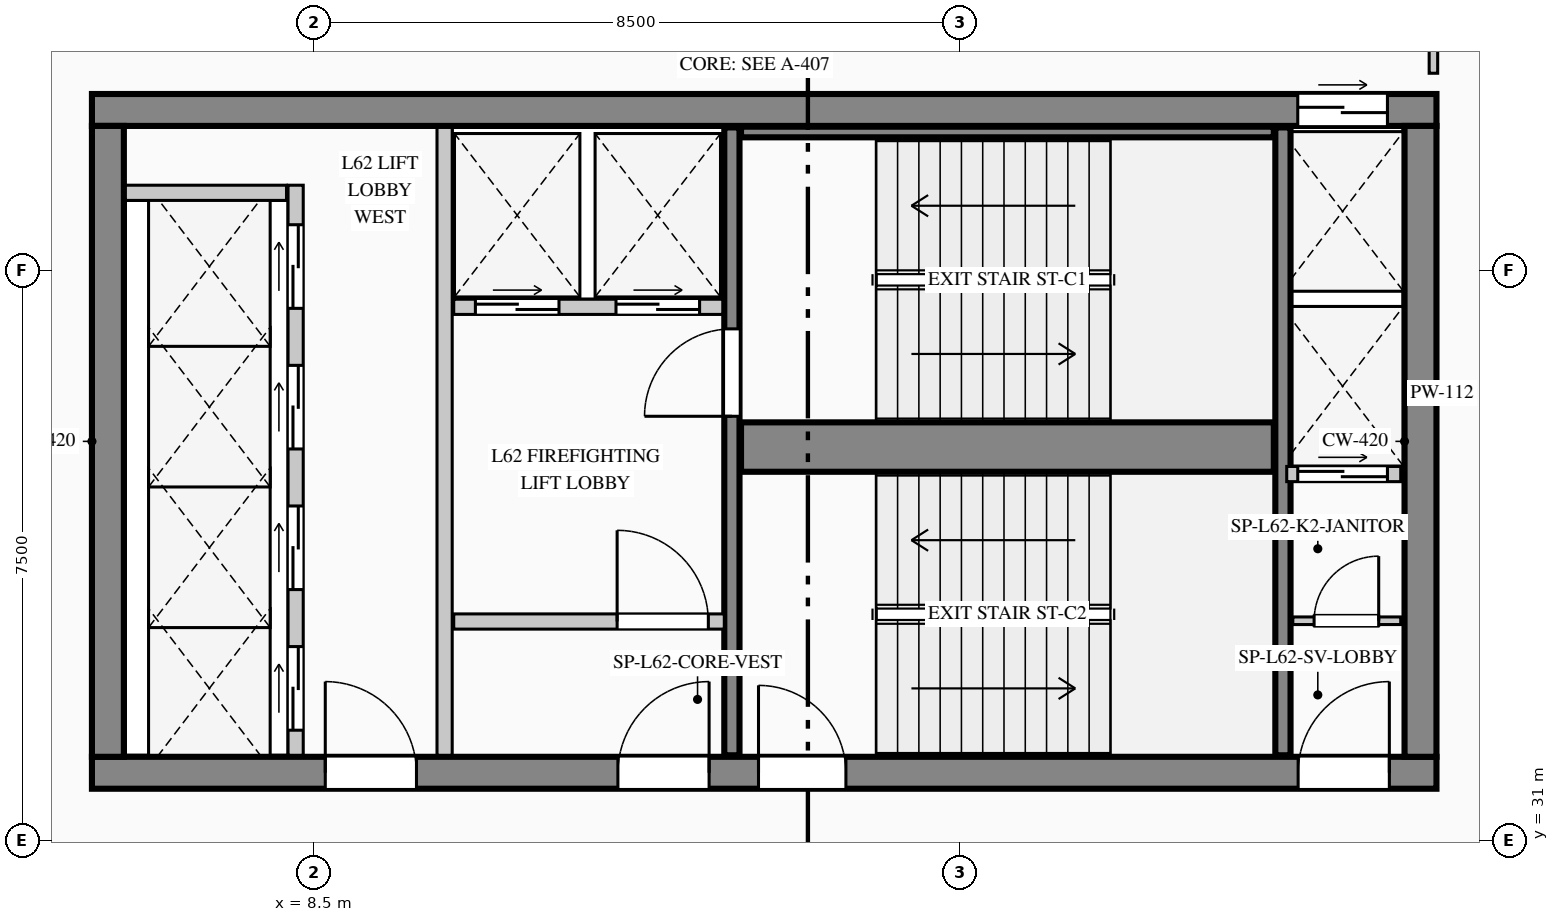
"""IFC4 building model, lengths in metres.
Left out: names, types, materials, properties, quantities, classifications, styles, units other than length and angle.
Written with IfcOpenShell. Run it as: python <this file> out.ifc"""

import sys

from ifc_helpers import new_model, si_unit, direction, frame, frame_2d, origin, place, context, subcontext, project, spatial, rectangle, extrude, element, fill, save


model = new_model("IFC4")
c1 = context("Model", 3, precision=1e-05, world=origin(), true_north=direction((0.0, 1.0)))
c2 = subcontext(c1, "Body", "Model", "MODEL_VIEW")
j1 = project(units=[si_unit("LENGTHUNIT", "METRE"), si_unit("PLANEANGLEUNIT", "RADIAN")], contexts=[c1])
p1 = place(None, origin())
s1 = spatial("IfcSite", under=j1, at=p1, CompositionType="ELEMENT")
p2 = place(p1, origin())
s2 = spatial("IfcBuilding", under=s1, at=p2, CompositionType="ELEMENT")
p3 = place(p2, frame((0.0, 0.0, 260.65)))
s3 = spatial("IfcBuildingStorey", under=s2, at=p3, CompositionType="ELEMENT", Elevation=260.65)
p4 = place(p3, frame((5.58, 40.61, 0.0), z_axis=(0.0, 0.0, 1.0), x_axis=(1.0, 0.0, 0.0)))
e1 = element("IfcWall", 1, at=p4, inside=s3, PredefinedType="SHEAR", context=c2, shape_type="SweptSolid", body=[
    extrude(rectangle(XDim=17.69, YDim=0.42, at=frame_2d((8.845, 0.0))), origin(), (0.0, 0.0, 1.0), 3.95),
])
p5 = place(p4, frame((15.865, 0.0, 0.0)))
e2 = element("IfcOpeningElement", 2, at=p5, cuts=e1, PredefinedType="OPENING", context=c2, shape_type="SweptSolid", body=[
    extrude(rectangle(XDim=1.18, YDim=2.25, at=frame_2d((0.59, 1.125))), frame((0.0, 0.22, 0.0), z_axis=(0.0, -1.0, 0.0), x_axis=(1.0, 0.0, 0.0)), (0.0, 0.0, 1.0), 0.44),
])
p6 = place(p3, frame((5.58, 31.89, 0.0), z_axis=(0.0, 0.0, 1.0), x_axis=(1.0, 0.0, 0.0)))
e3 = element("IfcWall", 3, at=p6, inside=s3, PredefinedType="SHEAR", context=c2, shape_type="SweptSolid", body=[
    extrude(rectangle(XDim=17.69, YDim=0.42, at=frame_2d((8.845, 0.0))), origin(), (0.0, 0.0, 1.0), 3.95),
])
p7 = place(p6, frame((3.07, 0.0, 0.0)))
e4 = element("IfcOpeningElement", 4, at=p7, cuts=e3, PredefinedType="OPENING", context=c2, shape_type="SweptSolid", body=[
    extrude(rectangle(XDim=1.2, YDim=2.2, at=frame_2d((0.6, 1.1))), frame((0.0, 0.22, 0.0), z_axis=(0.0, -1.0, 0.0), x_axis=(1.0, 0.0, 0.0)), (0.0, 0.0, 1.0), 0.44),
])
p8 = place(p6, frame((6.92, 0.0, 0.0)))
e5 = element("IfcOpeningElement", 5, at=p8, cuts=e3, PredefinedType="OPENING", context=c2, shape_type="SweptSolid", body=[
    extrude(rectangle(XDim=1.2, YDim=2.2, at=frame_2d((0.6, 1.1))), frame((0.0, 0.22, 0.0), z_axis=(0.0, -1.0, 0.0), x_axis=(1.0, 0.0, 0.0)), (0.0, 0.0, 1.0), 0.44),
])
p9 = place(p6, frame((8.77, 0.0, 0.0)))
e6 = element("IfcOpeningElement", 6, at=p9, cuts=e3, PredefinedType="OPENING", context=c2, shape_type="SweptSolid", body=[
    extrude(rectangle(XDim=1.15, YDim=2.2, at=frame_2d((0.575, 1.1))), frame((0.0, 0.22, 0.0), z_axis=(0.0, -1.0, 0.0), x_axis=(1.0, 0.0, 0.0)), (0.0, 0.0, 1.0), 0.44),
])
p10 = place(p6, frame((15.87, 0.0, 0.0)))
e7 = element("IfcOpeningElement", 7, at=p10, cuts=e3, PredefinedType="OPENING", context=c2, shape_type="SweptSolid", body=[
    extrude(rectangle(XDim=1.2, YDim=2.2, at=frame_2d((0.6, 1.1))), frame((0.0, 0.22, 0.0), z_axis=(0.0, -1.0, 0.0), x_axis=(1.0, 0.0, 0.0)), (0.0, 0.0, 1.0), 0.44),
])
for number, where, z_axis, x_axis in (
    (8, (5.79, 32.1, 0.0), (0.0, 0.0, 1.0), (0.0, 1.0, 0.0)),
    (9, (23.06, 32.1, 0.0), (0.0, 0.0, 1.0), (0.0, 1.0, 0.0)),
):
    element("IfcWall", number, at=place(p3, frame(where, z_axis=z_axis, x_axis=x_axis)), inside=s3, PredefinedType="SHEAR", context=c2, shape_type="SweptSolid", body=[
        extrude(rectangle(XDim=8.3, YDim=0.42, at=frame_2d((4.15, 0.0))), origin(), (0.0, 0.0, 1.0), 3.95),
    ])
p11 = place(p3, frame((14.0, 32.12, 0.0), z_axis=(0.0, 0.0, 1.0), x_axis=(0.0, 1.0, 0.0)))
e10 = element("IfcWall", 10, at=p11, inside=s3, PredefinedType="SHEAR", context=c2, shape_type="SweptSolid", body=[
    extrude(rectangle(XDim=8.26, YDim=0.2, at=frame_2d((4.13, 0.0))), origin(), (0.0, 0.0, 1.0), 3.95),
])
p12 = place(p11, frame((4.46, 0.0, 0.0)))
e11 = element("IfcOpeningElement", 11, at=p12, cuts=e10, PredefinedType="OPENING", context=c2, shape_type="SweptSolid", body=[
    extrude(rectangle(XDim=1.15, YDim=2.2, at=frame_2d((0.575, 1.1))), frame((0.0, 0.11, 0.0), z_axis=(0.0, -1.0, 0.0), x_axis=(1.0, 0.0, 0.0)), (0.0, 0.0, 1.0), 0.22),
])
p13 = place(p3, frame((14.12, 36.175, 0.0), z_axis=(0.0, 0.0, 1.0), x_axis=(1.0, 0.0, 0.0)))
e12 = element("IfcWall", 12, at=p13, inside=s3, PredefinedType="SHEAR", context=c2, shape_type="SweptSolid", body=[
    extrude(rectangle(XDim=7.01, YDim=0.65, at=frame_2d((3.505, 0.0))), origin(), (0.0, 0.0, 1.0), 3.95),
])
p14 = place(p3, frame((21.25, 32.12, 0.0), z_axis=(0.0, 0.0, 1.0), x_axis=(0.0, 1.0, 0.0)))
e13 = element("IfcWall", 13, at=p14, inside=s3, PredefinedType="SHEAR", context=c2, shape_type="SweptSolid", body=[
    extrude(rectangle(XDim=8.26, YDim=0.2, at=frame_2d((4.13, 0.0))), origin(), (0.0, 0.0, 1.0), 3.95),
])
p15 = place(p3, frame((14.12, 40.32, 0.0), z_axis=(0.0, 0.0, 1.0), x_axis=(1.0, 0.0, 0.0)))
e14 = element("IfcWall", 14, at=p15, inside=s3, PredefinedType="SHEAR", context=c2, shape_type="SweptSolid", body=[
    extrude(rectangle(XDim=7.01, YDim=0.14, at=frame_2d((3.505, 0.0))), origin(), (0.0, 0.0, 1.0), 3.95),
])
p16 = place(p3, frame((6.133, 4.42, 0.0), z_axis=(0.0, 0.0, 1.0), x_axis=(-0.089522678378, 0.995984784048, 0.0)))
e15 = element("IfcWall", 15, at=p16, inside=s3, PredefinedType="STANDARD", context=c2, shape_type="SweptSolid", body=[
    extrude(rectangle(XDim=37.31, YDim=0.24, at=frame_2d((18.655, 0.0))), origin(), (0.0, 0.0, 1.0), 3.7),
])
p17 = place(p16, frame((23.053, 0.0, 0.9)))
e16 = element("IfcOpeningElement", 16, at=p17, cuts=e15, PredefinedType="OPENING", context=c2, shape_type="SweptSolid", body=[
    extrude(rectangle(XDim=1.65, YDim=1.95, at=frame_2d((0.825, 0.975))), frame((0.0, 0.13, 0.0), z_axis=(0.0, -1.0, 0.0), x_axis=(1.0, 0.0, 0.0)), (0.0, 0.0, 1.0), 0.26),
])
p18 = place(p3, frame((8.26, 32.12, 0.0), z_axis=(0.0, 0.0, 1.0), x_axis=(0.0, 1.0, 0.0)))
e17 = element("IfcWall", 17, at=p18, inside=s3, PredefinedType="PARTITIONING", context=c2, shape_type="SweptSolid", body=[
    extrude(rectangle(XDim=7.5, YDim=0.2, at=frame_2d((3.75, 0.0))), origin(), (0.0, 0.0, 1.0), 3.7),
])
p19 = place(p18, frame((0.33, 0.0, 0.0)))
e18 = element("IfcOpeningElement", 18, at=p19, cuts=e17, PredefinedType="OPENING", context=c2, shape_type="SweptSolid", body=[
    extrude(rectangle(XDim=1.1, YDim=2.2, at=frame_2d((0.55, 1.1))), frame((0.0, 0.11, 0.0), z_axis=(0.0, -1.0, 0.0), x_axis=(1.0, 0.0, 0.0)), (0.0, 0.0, 1.0), 0.22),
])
p20 = place(p18, frame((2.18, 0.0, 0.0)))
e19 = element("IfcOpeningElement", 19, at=p20, cuts=e17, PredefinedType="OPENING", context=c2, shape_type="SweptSolid", body=[
    extrude(rectangle(XDim=1.1, YDim=2.2, at=frame_2d((0.55, 1.1))), frame((0.0, 0.11, 0.0), z_axis=(0.0, -1.0, 0.0), x_axis=(1.0, 0.0, 0.0)), (0.0, 0.0, 1.0), 0.22),
])
p21 = place(p18, frame((4.03, 0.0, 0.0)))
e20 = element("IfcOpeningElement", 20, at=p21, cuts=e17, PredefinedType="OPENING", context=c2, shape_type="SweptSolid", body=[
    extrude(rectangle(XDim=1.1, YDim=2.2, at=frame_2d((0.55, 1.1))), frame((0.0, 0.11, 0.0), z_axis=(0.0, -1.0, 0.0), x_axis=(1.0, 0.0, 0.0)), (0.0, 0.0, 1.0), 0.22),
])
p22 = place(p18, frame((5.88, 0.0, 0.0)))
e21 = element("IfcOpeningElement", 21, at=p22, cuts=e17, PredefinedType="OPENING", context=c2, shape_type="SweptSolid", body=[
    extrude(rectangle(XDim=1.1, YDim=2.2, at=frame_2d((0.55, 1.1))), frame((0.0, 0.11, 0.0), z_axis=(0.0, -1.0, 0.0), x_axis=(1.0, 0.0, 0.0)), (0.0, 0.0, 1.0), 0.22),
])
p23 = place(p3, frame((6.02, 39.52, 0.0), z_axis=(0.0, 0.0, 1.0), x_axis=(1.0, 0.0, 0.0)))
e22 = element("IfcWall", 22, at=p23, inside=s3, PredefinedType="PARTITIONING", context=c2, shape_type="SweptSolid", body=[
    extrude(rectangle(XDim=2.12, YDim=0.2, at=frame_2d((1.06, 0.0))), origin(), (0.0, 0.0, 1.0), 3.7),
])
p24 = place(p3, frame((10.22, 32.12, 0.0), z_axis=(0.0, 0.0, 1.0), x_axis=(0.0, 1.0, 0.0)))
e23 = element("IfcWall", 23, at=p24, inside=s3, PredefinedType="PARTITIONING", context=c2, shape_type="SweptSolid", body=[
    extrude(rectangle(XDim=8.26, YDim=0.2, at=frame_2d((4.13, 0.0))), origin(), (0.0, 0.0, 1.0), 3.7),
])
p25 = place(p3, frame((10.34, 38.02, 0.0), z_axis=(0.0, 0.0, 1.0), x_axis=(1.0, 0.0, 0.0)))
e24 = element("IfcWall", 24, at=p25, inside=s3, PredefinedType="PARTITIONING", context=c2, shape_type="SweptSolid", body=[
    extrude(rectangle(XDim=3.54, YDim=0.2, at=frame_2d((1.77, 0.0))), origin(), (0.0, 0.0, 1.0), 3.7),
])
p26 = place(p25, frame((0.285, 0.0, 0.0)))
e25 = element("IfcOpeningElement", 25, at=p26, cuts=e24, PredefinedType="OPENING", context=c2, shape_type="SweptSolid", body=[
    extrude(rectangle(XDim=1.1, YDim=2.2, at=frame_2d((0.55, 1.1))), frame((0.0, 0.11, 0.0), z_axis=(0.0, -1.0, 0.0), x_axis=(1.0, 0.0, 0.0)), (0.0, 0.0, 1.0), 0.22),
])
p27 = place(p25, frame((2.135, 0.0, 0.0)))
e26 = element("IfcOpeningElement", 26, at=p27, cuts=e24, PredefinedType="OPENING", context=c2, shape_type="SweptSolid", body=[
    extrude(rectangle(XDim=1.1, YDim=2.2, at=frame_2d((0.55, 1.1))), frame((0.0, 0.11, 0.0), z_axis=(0.0, -1.0, 0.0), x_axis=(1.0, 0.0, 0.0)), (0.0, 0.0, 1.0), 0.22),
])
p28 = place(p3, frame((10.34, 33.88, 0.0), z_axis=(0.0, 0.0, 1.0), x_axis=(1.0, 0.0, 0.0)))
e27 = element("IfcWall", 27, at=p28, inside=s3, PredefinedType="PARTITIONING", context=c2, shape_type="SweptSolid", body=[
    extrude(rectangle(XDim=3.56, YDim=0.2, at=frame_2d((1.78, 0.0))), origin(), (0.0, 0.0, 1.0), 3.7),
])
p29 = place(p28, frame((2.15, 0.0, 0.0)))
e28 = element("IfcOpeningElement", 28, at=p29, cuts=e27, PredefinedType="OPENING", context=c2, shape_type="SweptSolid", body=[
    extrude(rectangle(XDim=1.2, YDim=2.2, at=frame_2d((0.6, 1.1))), frame((0.0, 0.11, 0.0), z_axis=(0.0, -1.0, 0.0), x_axis=(1.0, 0.0, 0.0)), (0.0, 0.0, 1.0), 0.22),
])
p30 = place(p3, frame((21.38, 33.89, 0.0), z_axis=(0.0, 0.0, 1.0), x_axis=(1.0, 0.0, 0.0)))
e29 = element("IfcWall", 29, at=p30, inside=s3, PredefinedType="PARTITIONING", context=c2, shape_type="SweptSolid", body=[
    extrude(rectangle(XDim=1.42, YDim=0.1, at=frame_2d((0.71, 0.0))), origin(), (0.0, 0.0, 1.0), 3.7),
])
p31 = place(p30, frame((0.28, 0.0, 0.0)))
e30 = element("IfcOpeningElement", 30, at=p31, cuts=e29, PredefinedType="OPENING", context=c2, shape_type="SweptSolid", body=[
    extrude(rectangle(XDim=0.85, YDim=2.1, at=frame_2d((0.425, 1.05))), frame((0.0, 0.06, 0.0), z_axis=(0.0, -1.0, 0.0), x_axis=(1.0, 0.0, 0.0)), (0.0, 0.0, 1.0), 0.12),
])
p32 = place(p3, frame((21.3, 35.82, 0.0), z_axis=(0.0, 0.0, 1.0), x_axis=(1.0, 0.0, 0.0)))
e31 = element("IfcWall", 31, at=p32, inside=s3, PredefinedType="PARTITIONING", context=c2, shape_type="SweptSolid", body=[
    extrude(rectangle(XDim=1.5, YDim=0.2, at=frame_2d((0.75, 0.0))), origin(), (0.0, 0.0, 1.0), 3.7),
])
p33 = place(p32, frame((0.145, 0.0, 0.0)))
e32 = element("IfcOpeningElement", 32, at=p33, cuts=e31, PredefinedType="OPENING", context=c2, shape_type="SweptSolid", body=[
    extrude(rectangle(XDim=1.18, YDim=2.25, at=frame_2d((0.59, 1.125))), frame((0.0, 0.11, 0.0), z_axis=(0.0, -1.0, 0.0), x_axis=(1.0, 0.0, 0.0)), (0.0, 0.0, 1.0), 0.22),
])
p34 = place(p3, frame((23.23, 41.093, 0.0), z_axis=(0.0, 0.0, 1.0), x_axis=(0.0, 1.0, 0.0)))
e33 = element("IfcWall", 33, at=p34, inside=s3, PredefinedType="PARTITIONING", context=c2, shape_type="SweptSolid", body=[
    extrude(rectangle(XDim=2.182, YDim=0.112, at=frame_2d((1.091, 0.0))), origin(), (0.0, 0.0, 1.0), 3.7),
])
p35 = place(p7, origin())
e34 = element("IfcDoor", 34, at=p35, inside=s3, OperationType="SINGLE_SWING_LEFT", PredefinedType="DOOR", context=c2, shape_type="SweptSolid", body=[
    extrude(rectangle(XDim=1.2, YDim=2.2, at=frame_2d((0.6, 1.1))), frame((0.0, 0.025, 0.0), z_axis=(0.0, -1.0, 0.0), x_axis=(1.0, 0.0, 0.0)), (0.0, 0.0, 1.0), 0.05),
])
fill(e4, e34)
p36 = place(p8, origin())
e35 = element("IfcDoor", 35, at=p36, inside=s3, OperationType="SINGLE_SWING_RIGHT", PredefinedType="DOOR", context=c2, shape_type="SweptSolid", body=[
    extrude(rectangle(XDim=1.2, YDim=2.2, at=frame_2d((0.6, 1.1))), frame((0.0, 0.025, 0.0), z_axis=(0.0, -1.0, 0.0), x_axis=(1.0, 0.0, 0.0)), (0.0, 0.0, 1.0), 0.05),
])
fill(e5, e35)
p37 = place(p9, origin())
e36 = element("IfcDoor", 36, at=p37, inside=s3, OperationType="SINGLE_SWING_LEFT", PredefinedType="DOOR", context=c2, shape_type="SweptSolid", body=[
    extrude(rectangle(XDim=1.15, YDim=2.2, at=frame_2d((0.575, 1.1))), frame((0.0, 0.025, 0.0), z_axis=(0.0, -1.0, 0.0), x_axis=(1.0, 0.0, 0.0)), (0.0, 0.0, 1.0), 0.05),
])
fill(e6, e36)
p38 = place(p10, origin())
e37 = element("IfcDoor", 37, at=p38, inside=s3, OperationType="SINGLE_SWING_RIGHT", PredefinedType="DOOR", context=c2, shape_type="SweptSolid", body=[
    extrude(rectangle(XDim=1.2, YDim=2.2, at=frame_2d((0.6, 1.1))), frame((0.0, 0.025, 0.0), z_axis=(0.0, -1.0, 0.0), x_axis=(1.0, 0.0, 0.0)), (0.0, 0.0, 1.0), 0.05),
])
fill(e7, e37)
p39 = place(p29, origin())
e38 = element("IfcDoor", 38, at=p39, inside=s3, OperationType="SINGLE_SWING_LEFT", PredefinedType="DOOR", context=c2, shape_type="SweptSolid", body=[
    extrude(rectangle(XDim=1.2, YDim=2.2, at=frame_2d((0.6, 1.1))), frame((0.0, 0.025, 0.0), z_axis=(0.0, -1.0, 0.0), x_axis=(1.0, 0.0, 0.0)), (0.0, 0.0, 1.0), 0.05),
])
fill(e28, e38)
p40 = place(p31, origin())
e39 = element("IfcDoor", 39, at=p40, inside=s3, OperationType="SINGLE_SWING_RIGHT", PredefinedType="DOOR", context=c2, shape_type="SweptSolid", body=[
    extrude(rectangle(XDim=0.85, YDim=2.1, at=frame_2d((0.425, 1.05))), frame((0.0, 0.025, 0.0), z_axis=(0.0, -1.0, 0.0), x_axis=(1.0, 0.0, 0.0)), (0.0, 0.0, 1.0), 0.05),
])
fill(e30, e39)
p41 = place(p12, origin())
e40 = element("IfcDoor", 40, at=p41, inside=s3, OperationType="SINGLE_SWING_LEFT", PredefinedType="DOOR", context=c2, shape_type="SweptSolid", body=[
    extrude(rectangle(XDim=1.15, YDim=2.2, at=frame_2d((0.575, 1.1))), frame((0.0, 0.025, 0.0), z_axis=(0.0, -1.0, 0.0), x_axis=(1.0, 0.0, 0.0)), (0.0, 0.0, 1.0), 0.05),
])
fill(e11, e40)
p42 = place(p19, origin())
e41 = element("IfcDoor", 41, at=p42, inside=s3, OperationType="DOUBLE_DOOR_SLIDING", PredefinedType="DOOR", context=c2, shape_type="SweptSolid", body=[
    extrude(rectangle(XDim=1.1, YDim=2.2, at=frame_2d((0.55, 1.1))), frame((0.0, 0.025, 0.0), z_axis=(0.0, -1.0, 0.0), x_axis=(1.0, 0.0, 0.0)), (0.0, 0.0, 1.0), 0.05),
])
fill(e18, e41)
p43 = place(p20, origin())
e42 = element("IfcDoor", 42, at=p43, inside=s3, OperationType="DOUBLE_DOOR_SLIDING", PredefinedType="DOOR", context=c2, shape_type="SweptSolid", body=[
    extrude(rectangle(XDim=1.1, YDim=2.2, at=frame_2d((0.55, 1.1))), frame((0.0, 0.025, 0.0), z_axis=(0.0, -1.0, 0.0), x_axis=(1.0, 0.0, 0.0)), (0.0, 0.0, 1.0), 0.05),
])
fill(e19, e42)
p44 = place(p21, origin())
e43 = element("IfcDoor", 43, at=p44, inside=s3, OperationType="DOUBLE_DOOR_SLIDING", PredefinedType="DOOR", context=c2, shape_type="SweptSolid", body=[
    extrude(rectangle(XDim=1.1, YDim=2.2, at=frame_2d((0.55, 1.1))), frame((0.0, 0.025, 0.0), z_axis=(0.0, -1.0, 0.0), x_axis=(1.0, 0.0, 0.0)), (0.0, 0.0, 1.0), 0.05),
])
fill(e20, e43)
p45 = place(p22, origin())
e44 = element("IfcDoor", 44, at=p45, inside=s3, OperationType="DOUBLE_DOOR_SLIDING", PredefinedType="DOOR", context=c2, shape_type="SweptSolid", body=[
    extrude(rectangle(XDim=1.1, YDim=2.2, at=frame_2d((0.55, 1.1))), frame((0.0, 0.025, 0.0), z_axis=(0.0, -1.0, 0.0), x_axis=(1.0, 0.0, 0.0)), (0.0, 0.0, 1.0), 0.05),
])
fill(e21, e44)
p46 = place(p26, origin())
e45 = element("IfcDoor", 45, at=p46, inside=s3, OperationType="DOUBLE_DOOR_SLIDING", PredefinedType="DOOR", context=c2, shape_type="SweptSolid", body=[
    extrude(rectangle(XDim=1.1, YDim=2.2, at=frame_2d((0.55, 1.1))), frame((0.0, 0.025, 0.0), z_axis=(0.0, -1.0, 0.0), x_axis=(1.0, 0.0, 0.0)), (0.0, 0.0, 1.0), 0.05),
])
fill(e25, e45)
p47 = place(p27, origin())
e46 = element("IfcDoor", 46, at=p47, inside=s3, OperationType="DOUBLE_DOOR_SLIDING", PredefinedType="DOOR", context=c2, shape_type="SweptSolid", body=[
    extrude(rectangle(XDim=1.1, YDim=2.2, at=frame_2d((0.55, 1.1))), frame((0.0, 0.025, 0.0), z_axis=(0.0, -1.0, 0.0), x_axis=(1.0, 0.0, 0.0)), (0.0, 0.0, 1.0), 0.05),
])
fill(e26, e46)
p48 = place(p5, origin())
e47 = element("IfcDoor", 47, at=p48, inside=s3, OperationType="DOUBLE_DOOR_SLIDING", PredefinedType="DOOR", context=c2, shape_type="SweptSolid", body=[
    extrude(rectangle(XDim=1.18, YDim=2.25, at=frame_2d((0.59, 1.125))), frame((0.0, 0.025, 0.0), z_axis=(0.0, -1.0, 0.0), x_axis=(1.0, 0.0, 0.0)), (0.0, 0.0, 1.0), 0.05),
])
fill(e2, e47)
p49 = place(p33, origin())
e48 = element("IfcDoor", 48, at=p49, inside=s3, OperationType="DOUBLE_DOOR_SLIDING", PredefinedType="DOOR", context=c2, shape_type="SweptSolid", body=[
    extrude(rectangle(XDim=1.18, YDim=2.25, at=frame_2d((0.59, 1.125))), frame((0.0, 0.025, 0.0), z_axis=(0.0, -1.0, 0.0), x_axis=(1.0, 0.0, 0.0)), (0.0, 0.0, 1.0), 0.05),
])
fill(e32, e48)
save(model, sys.argv[1])
